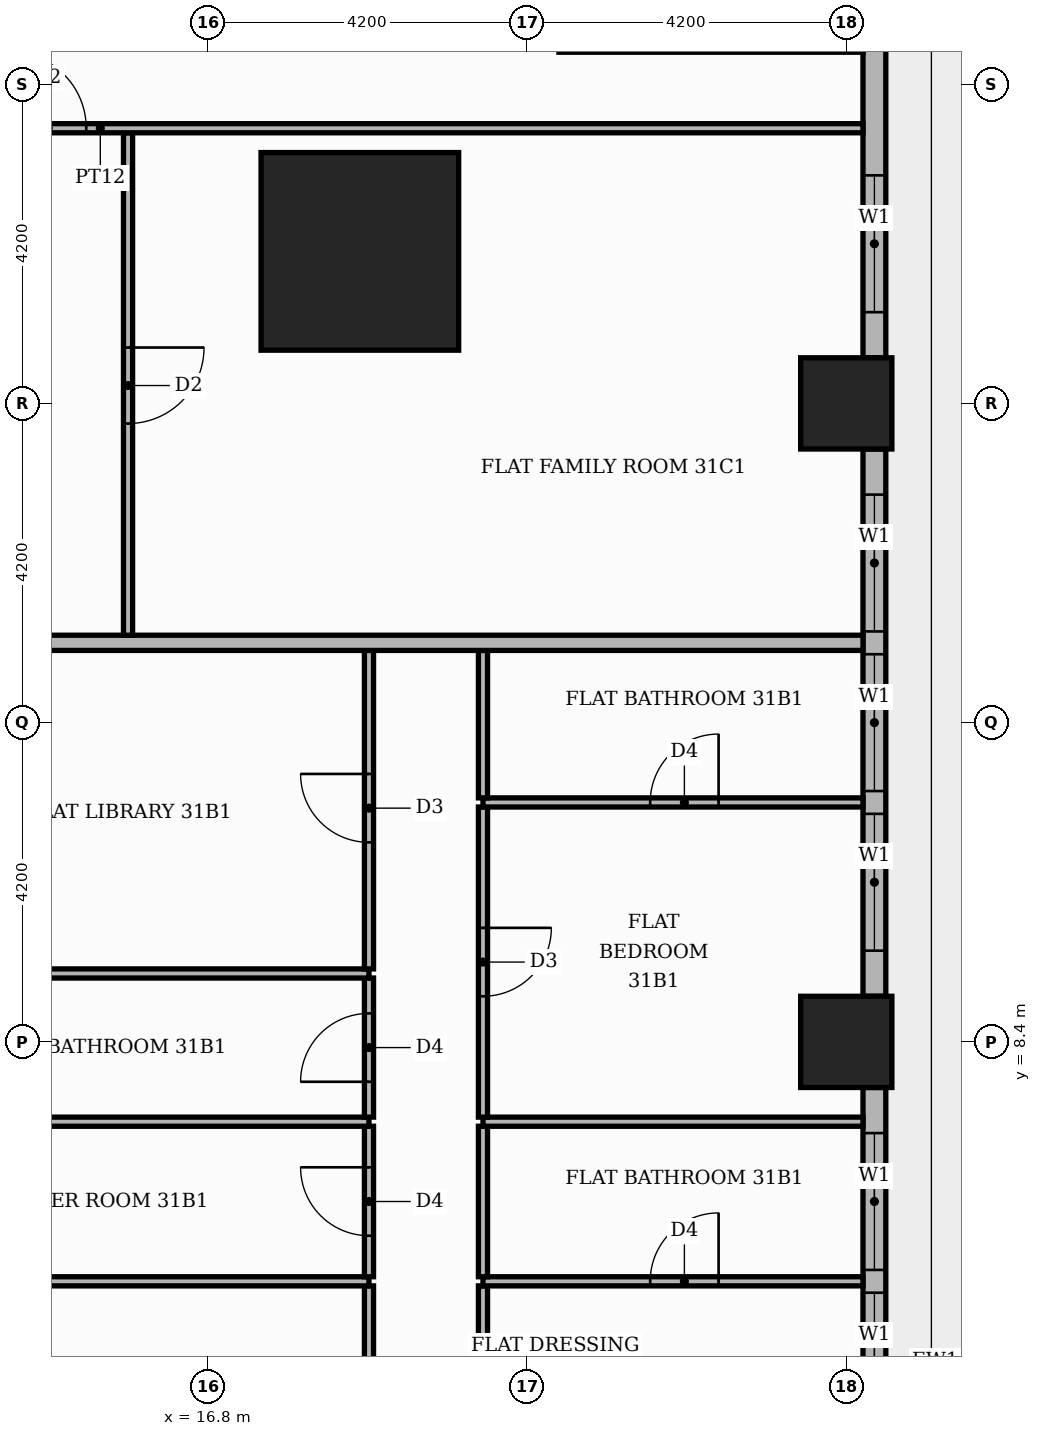
"""IFC4 building model, lengths in metres.
Left out: names, types, materials, properties, quantities, classifications, styles, units other than length and angle.
Written with IfcOpenShell. Run it as: python <this file> out.ifc"""

import sys

from ifc_helpers import new_model, si_unit, direction, frame, frame_2d, origin, origin_2d, place, context, subcontext, project, spatial, rectangle, extrude, element, fill, save


model = new_model("IFC4")
c1 = context("Model", 3, precision=1e-05, world=origin(), true_north=direction((0.0, 1.0)))
c2 = subcontext(c1, "Body", "Model", "MODEL_VIEW")
j1 = project(units=[si_unit("LENGTHUNIT", "METRE"), si_unit("PLANEANGLEUNIT", "RADIAN")], contexts=[c1])
p1 = place(None, origin())
s1 = spatial("IfcSite", under=j1, at=p1, CompositionType="ELEMENT")
p2 = place(p1, origin())
s2 = spatial("IfcBuilding", under=s1, at=p2, CompositionType="ELEMENT")
p3 = place(p2, frame((0.0, 0.0, 133.8)))
s3 = spatial("IfcBuildingStorey", under=s2, at=p3, CompositionType="ELEMENT", Elevation=133.8)
p4 = place(p3, frame((18.8, 18.8, 0.0), z_axis=(0.0, 0.0, 1.0), x_axis=(1.0, 0.0, 0.0)))
e1 = element("IfcColumn", 1, at=p4, inside=s3, PredefinedType="COLUMN", context=c2, shape_type="SweptSolid", body=[
    extrude(rectangle(XDim=2.6, YDim=2.6, at=origin_2d()), origin(), (0.0, 0.0, 1.0), 3.9),
])
for number, where, z_axis, x_axis in (
    (2, (25.2, 8.4, 0.0), (0.0, 0.0, 1.0), (1.0, 0.0, 0.0)),
    (3, (25.2, 16.8, 0.0), (0.0, 0.0, 1.0), (1.0, 0.0, 0.0)),
):
    element("IfcColumn", number, at=place(p3, frame(where, z_axis=z_axis, x_axis=x_axis)), inside=s3, PredefinedType="COLUMN", context=c2, shape_type="SweptSolid", body=[
        extrude(rectangle(XDim=1.2, YDim=1.2, at=origin_2d()), origin(), (0.0, 0.0, 1.0), 3.9),
    ])
p5 = place(p3, frame((25.57, 0.6, 0.0), z_axis=(0.0, 0.0, 1.0), x_axis=(0.0, 1.0, 0.0)))
e4 = element("IfcWall", 4, at=p5, inside=s3, PredefinedType="STANDARD", context=c2, shape_type="SweptSolid", body=[
    extrude(rectangle(XDim=7.2, YDim=0.3, at=frame_2d((3.6, 0.0))), origin(), (0.0, 0.0, 1.0), 3.48),
])
p6 = place(p5, frame((0.6, 0.0, 0.0)))
e5 = element("IfcOpeningElement", 5, at=p6, cuts=e4, PredefinedType="OPENING", context=c2, shape_type="SweptSolid", body=[
    extrude(rectangle(XDim=1.8, YDim=2.4, at=frame_2d((0.9, 1.2))), frame((0.0, 0.16, 0.0), z_axis=(0.0, -1.0, 0.0), x_axis=(1.0, 0.0, 0.0)), (0.0, 0.0, 1.0), 0.32),
])
p7 = place(p5, frame((2.7, 0.0, 0.9)))
e6 = element("IfcOpeningElement", 6, at=p7, cuts=e4, PredefinedType="OPENING", context=c2, shape_type="SweptSolid", body=[
    extrude(rectangle(XDim=1.8, YDim=2.1, at=frame_2d((0.9, 1.05))), frame((0.0, 0.16, 0.0), z_axis=(0.0, -1.0, 0.0), x_axis=(1.0, 0.0, 0.0)), (0.0, 0.0, 1.0), 0.32),
])
p8 = place(p5, frame((4.8, 0.0, 0.9)))
e7 = element("IfcOpeningElement", 7, at=p8, cuts=e4, PredefinedType="OPENING", context=c2, shape_type="SweptSolid", body=[
    extrude(rectangle(XDim=1.8, YDim=2.1, at=frame_2d((0.9, 1.05))), frame((0.0, 0.16, 0.0), z_axis=(0.0, -1.0, 0.0), x_axis=(1.0, 0.0, 0.0)), (0.0, 0.0, 1.0), 0.32),
])
p9 = place(p3, frame((25.57, 9.0, 0.0), z_axis=(0.0, 0.0, 1.0), x_axis=(0.0, 1.0, 0.0)))
e8 = element("IfcWall", 8, at=p9, inside=s3, PredefinedType="STANDARD", context=c2, shape_type="SweptSolid", body=[
    extrude(rectangle(XDim=7.2, YDim=0.3, at=frame_2d((3.6, 0.0))), origin(), (0.0, 0.0, 1.0), 3.48),
])
p10 = place(p9, frame((0.6, 0.0, 0.9)))
e9 = element("IfcOpeningElement", 9, at=p10, cuts=e8, PredefinedType="OPENING", context=c2, shape_type="SweptSolid", body=[
    extrude(rectangle(XDim=1.8, YDim=2.1, at=frame_2d((0.9, 1.05))), frame((0.0, 0.16, 0.0), z_axis=(0.0, -1.0, 0.0), x_axis=(1.0, 0.0, 0.0)), (0.0, 0.0, 1.0), 0.32),
])
p11 = place(p9, frame((2.7, 0.0, 0.9)))
e10 = element("IfcOpeningElement", 10, at=p11, cuts=e8, PredefinedType="OPENING", context=c2, shape_type="SweptSolid", body=[
    extrude(rectangle(XDim=1.8, YDim=2.1, at=frame_2d((0.9, 1.05))), frame((0.0, 0.16, 0.0), z_axis=(0.0, -1.0, 0.0), x_axis=(1.0, 0.0, 0.0)), (0.0, 0.0, 1.0), 0.32),
])
p12 = place(p9, frame((4.8, 0.0, 0.9)))
e11 = element("IfcOpeningElement", 11, at=p12, cuts=e8, PredefinedType="OPENING", context=c2, shape_type="SweptSolid", body=[
    extrude(rectangle(XDim=1.8, YDim=2.1, at=frame_2d((0.9, 1.05))), frame((0.0, 0.16, 0.0), z_axis=(0.0, -1.0, 0.0), x_axis=(1.0, 0.0, 0.0)), (0.0, 0.0, 1.0), 0.32),
])
p13 = place(p3, frame((25.57, 17.4, 0.0), z_axis=(0.0, 0.0, 1.0), x_axis=(0.0, 1.0, 0.0)))
e12 = element("IfcWall", 12, at=p13, inside=s3, PredefinedType="STANDARD", context=c2, shape_type="SweptSolid", body=[
    extrude(rectangle(XDim=4.32, YDim=0.3, at=frame_2d((2.16, 0.0))), origin(), (0.0, 0.0, 1.0), 3.48),
])
p14 = place(p13, frame((0.6, 0.0, 0.9)))
e13 = element("IfcOpeningElement", 13, at=p14, cuts=e12, PredefinedType="OPENING", context=c2, shape_type="SweptSolid", body=[
    extrude(rectangle(XDim=1.8, YDim=2.1, at=frame_2d((0.9, 1.05))), frame((0.0, 0.16, 0.0), z_axis=(0.0, -1.0, 0.0), x_axis=(1.0, 0.0, 0.0)), (0.0, 0.0, 1.0), 0.32),
])
p15 = place(p3, frame((18.92, 1.11, 0.0), z_axis=(0.0, 0.0, 1.0), x_axis=(0.0, 1.0, 0.0)))
e14 = element("IfcWall", 14, at=p15, inside=s3, PredefinedType="PARTITIONING", context=c2, shape_type="SweptSolid", body=[
    extrude(rectangle(XDim=4.08, YDim=0.12, at=frame_2d((2.04, 0.0))), origin(), (0.0, 0.0, 1.0), 3.48),
])
p16 = place(p15, frame((1.59, 0.0, 0.0)))
e15 = element("IfcOpeningElement", 15, at=p16, cuts=e14, PredefinedType="OPENING", context=c2, shape_type="SweptSolid", body=[
    extrude(rectangle(XDim=0.9, YDim=2.1, at=frame_2d((0.45, 1.05))), frame((0.0, 0.07, 0.0), z_axis=(0.0, -1.0, 0.0), x_axis=(1.0, 0.0, 0.0)), (0.0, 0.0, 1.0), 0.14),
])
p17 = place(p3, frame((20.42, 3.21, 0.0), z_axis=(0.0, 0.0, 1.0), x_axis=(0.0, 1.0, 0.0)))
e16 = element("IfcWall", 16, at=p17, inside=s3, PredefinedType="PARTITIONING", context=c2, shape_type="SweptSolid", body=[
    extrude(rectangle(XDim=1.98, YDim=0.12, at=frame_2d((0.99, 0.0))), origin(), (0.0, 0.0, 1.0), 3.48),
])
p18 = place(p3, frame((11.0, 5.25, 0.0), z_axis=(0.0, 0.0, 1.0), x_axis=(1.0, 0.0, 0.0)))
e17 = element("IfcWall", 17, at=p18, inside=s3, PredefinedType="PARTITIONING", context=c2, shape_type="SweptSolid", body=[
    extrude(rectangle(XDim=7.92, YDim=0.12, at=frame_2d((3.96, 0.0))), origin(), (0.0, 0.0, 1.0), 3.48),
])
p19 = place(p3, frame((20.42, 5.25, 0.0), z_axis=(0.0, 0.0, 1.0), x_axis=(1.0, 0.0, 0.0)))
e18 = element("IfcWall", 18, at=p19, inside=s3, PredefinedType="PARTITIONING", context=c2, shape_type="SweptSolid", body=[
    extrude(rectangle(XDim=5.0, YDim=0.12, at=frame_2d((2.5, 0.0))), origin(), (0.0, 0.0, 1.0), 3.48),
])
p20 = place(p19, frame((2.2, 0.0, 0.0)))
e19 = element("IfcOpeningElement", 19, at=p20, cuts=e18, PredefinedType="OPENING", context=c2, shape_type="SweptSolid", body=[
    extrude(rectangle(XDim=0.9, YDim=2.1, at=frame_2d((0.45, 1.05))), frame((0.0, 0.07, 0.0), z_axis=(0.0, -1.0, 0.0), x_axis=(1.0, 0.0, 0.0)), (0.0, 0.0, 1.0), 0.14),
])
p21 = place(p3, frame((18.92, 5.31, 0.0), z_axis=(0.0, 0.0, 1.0), x_axis=(0.0, 1.0, 0.0)))
e20 = element("IfcWall", 20, at=p21, inside=s3, PredefinedType="PARTITIONING", context=c2, shape_type="SweptSolid", body=[
    extrude(rectangle(XDim=1.98, YDim=0.12, at=frame_2d((0.99, 0.0))), origin(), (0.0, 0.0, 1.0), 3.48),
])
p22 = place(p21, frame((0.54, 0.0, 0.0)))
e21 = element("IfcOpeningElement", 21, at=p22, cuts=e20, PredefinedType="OPENING", context=c2, shape_type="SweptSolid", body=[
    extrude(rectangle(XDim=0.9, YDim=2.1, at=frame_2d((0.45, 1.05))), frame((0.0, 0.07, 0.0), z_axis=(0.0, -1.0, 0.0), x_axis=(1.0, 0.0, 0.0)), (0.0, 0.0, 1.0), 0.14),
])
p23 = place(p3, frame((20.42, 5.31, 0.0), z_axis=(0.0, 0.0, 1.0), x_axis=(0.0, 1.0, 0.0)))
e22 = element("IfcWall", 22, at=p23, inside=s3, PredefinedType="PARTITIONING", context=c2, shape_type="SweptSolid", body=[
    extrude(rectangle(XDim=1.98, YDim=0.12, at=frame_2d((0.99, 0.0))), origin(), (0.0, 0.0, 1.0), 3.48),
])
p24 = place(p3, frame((11.0, 7.35, 0.0), z_axis=(0.0, 0.0, 1.0), x_axis=(1.0, 0.0, 0.0)))
e23 = element("IfcWall", 23, at=p24, inside=s3, PredefinedType="PARTITIONING", context=c2, shape_type="SweptSolid", body=[
    extrude(rectangle(XDim=7.92, YDim=0.12, at=frame_2d((3.96, 0.0))), origin(), (0.0, 0.0, 1.0), 3.48),
])
p25 = place(p3, frame((20.42, 7.35, 0.0), z_axis=(0.0, 0.0, 1.0), x_axis=(1.0, 0.0, 0.0)))
e24 = element("IfcWall", 24, at=p25, inside=s3, PredefinedType="PARTITIONING", context=c2, shape_type="SweptSolid", body=[
    extrude(rectangle(XDim=5.0, YDim=0.12, at=frame_2d((2.5, 0.0))), origin(), (0.0, 0.0, 1.0), 3.48),
])
p26 = place(p3, frame((18.92, 7.41, 0.0), z_axis=(0.0, 0.0, 1.0), x_axis=(0.0, 1.0, 0.0)))
e25 = element("IfcWall", 25, at=p26, inside=s3, PredefinedType="PARTITIONING", context=c2, shape_type="SweptSolid", body=[
    extrude(rectangle(XDim=1.83, YDim=0.12, at=frame_2d((0.915, 0.0))), origin(), (0.0, 0.0, 1.0), 3.48),
])
p27 = place(p26, frame((0.465, 0.0, 0.0)))
e26 = element("IfcOpeningElement", 26, at=p27, cuts=e25, PredefinedType="OPENING", context=c2, shape_type="SweptSolid", body=[
    extrude(rectangle(XDim=0.9, YDim=2.1, at=frame_2d((0.45, 1.05))), frame((0.0, 0.07, 0.0), z_axis=(0.0, -1.0, 0.0), x_axis=(1.0, 0.0, 0.0)), (0.0, 0.0, 1.0), 0.14),
])
p28 = place(p3, frame((20.42, 7.41, 0.0), z_axis=(0.0, 0.0, 1.0), x_axis=(0.0, 1.0, 0.0)))
e27 = element("IfcWall", 27, at=p28, inside=s3, PredefinedType="PARTITIONING", context=c2, shape_type="SweptSolid", body=[
    extrude(rectangle(XDim=4.08, YDim=0.12, at=frame_2d((2.04, 0.0))), origin(), (0.0, 0.0, 1.0), 3.48),
])
p29 = place(p28, frame((1.59, 0.0, 0.0)))
e28 = element("IfcOpeningElement", 28, at=p29, cuts=e27, PredefinedType="OPENING", context=c2, shape_type="SweptSolid", body=[
    extrude(rectangle(XDim=0.9, YDim=2.1, at=frame_2d((0.45, 1.05))), frame((0.0, 0.07, 0.0), z_axis=(0.0, -1.0, 0.0), x_axis=(1.0, 0.0, 0.0)), (0.0, 0.0, 1.0), 0.14),
])
p30 = place(p3, frame((11.0, 9.3, 0.0), z_axis=(0.0, 0.0, 1.0), x_axis=(1.0, 0.0, 0.0)))
e29 = element("IfcWall", 29, at=p30, inside=s3, PredefinedType="PARTITIONING", context=c2, shape_type="SweptSolid", body=[
    extrude(rectangle(XDim=7.92, YDim=0.12, at=frame_2d((3.96, 0.0))), origin(), (0.0, 0.0, 1.0), 3.48),
])
p31 = place(p3, frame((18.92, 9.36, 0.0), z_axis=(0.0, 0.0, 1.0), x_axis=(0.0, 1.0, 0.0)))
e30 = element("IfcWall", 30, at=p31, inside=s3, PredefinedType="PARTITIONING", context=c2, shape_type="SweptSolid", body=[
    extrude(rectangle(XDim=4.19, YDim=0.12, at=frame_2d((2.095, 0.0))), origin(), (0.0, 0.0, 1.0), 3.48),
])
p32 = place(p31, frame((1.665, 0.0, 0.0)))
e31 = element("IfcOpeningElement", 31, at=p32, cuts=e30, PredefinedType="OPENING", context=c2, shape_type="SweptSolid", body=[
    extrude(rectangle(XDim=0.9, YDim=2.1, at=frame_2d((0.45, 1.05))), frame((0.0, 0.07, 0.0), z_axis=(0.0, -1.0, 0.0), x_axis=(1.0, 0.0, 0.0)), (0.0, 0.0, 1.0), 0.14),
])
p33 = place(p3, frame((20.42, 11.55, 0.0), z_axis=(0.0, 0.0, 1.0), x_axis=(1.0, 0.0, 0.0)))
e32 = element("IfcWall", 32, at=p33, inside=s3, PredefinedType="PARTITIONING", context=c2, shape_type="SweptSolid", body=[
    extrude(rectangle(XDim=5.0, YDim=0.12, at=frame_2d((2.5, 0.0))), origin(), (0.0, 0.0, 1.0), 3.48),
])
p34 = place(p33, frame((2.2, 0.0, 0.0)))
e33 = element("IfcOpeningElement", 33, at=p34, cuts=e32, PredefinedType="OPENING", context=c2, shape_type="SweptSolid", body=[
    extrude(rectangle(XDim=0.9, YDim=2.1, at=frame_2d((0.45, 1.05))), frame((0.0, 0.07, 0.0), z_axis=(0.0, -1.0, 0.0), x_axis=(1.0, 0.0, 0.0)), (0.0, 0.0, 1.0), 0.14),
])
p35 = place(p3, frame((20.42, 11.61, 0.0), z_axis=(0.0, 0.0, 1.0), x_axis=(0.0, 1.0, 0.0)))
e34 = element("IfcWall", 34, at=p35, inside=s3, PredefinedType="PARTITIONING", context=c2, shape_type="SweptSolid", body=[
    extrude(rectangle(XDim=1.94, YDim=0.12, at=frame_2d((0.97, 0.0))), origin(), (0.0, 0.0, 1.0), 3.48),
])
p36 = place(p3, frame((-13.65, 13.65, 0.0), z_axis=(0.0, 0.0, 1.0), x_axis=(1.0, 0.0, 0.0)))
e35 = element("IfcWall", 35, at=p36, inside=s3, PredefinedType="PARTITIONING", context=c2, shape_type="SweptSolid", body=[
    extrude(rectangle(XDim=39.07, YDim=0.2, at=frame_2d((19.535, 0.0))), origin(), (0.0, 0.0, 1.0), 3.48),
])
p37 = place(p36, frame((24.65, 0.0, 0.0)))
e36 = element("IfcOpeningElement", 36, at=p37, cuts=e35, PredefinedType="OPENING", context=c2, shape_type="SweptSolid", body=[
    extrude(rectangle(XDim=1.1, YDim=2.4, at=frame_2d((0.55, 1.2))), frame((0.0, 0.11, 0.0), z_axis=(0.0, -1.0, 0.0), x_axis=(1.0, 0.0, 0.0)), (0.0, 0.0, 1.0), 0.22),
])
p38 = place(p36, frame((12.05, 0.0, 0.0)))
e37 = element("IfcOpeningElement", 37, at=p38, cuts=e35, PredefinedType="OPENING", context=c2, shape_type="SweptSolid", body=[
    extrude(rectangle(XDim=1.1, YDim=2.4, at=frame_2d((0.55, 1.2))), frame((0.0, 0.11, 0.0), z_axis=(0.0, -1.0, 0.0), x_axis=(1.0, 0.0, 0.0)), (0.0, 0.0, 1.0), 0.22),
])
p39 = place(p3, frame((15.75, 13.75, 0.0), z_axis=(0.0, 0.0, 1.0), x_axis=(0.0, 1.0, 0.0)))
e38 = element("IfcWall", 38, at=p39, inside=s3, PredefinedType="PARTITIONING", context=c2, shape_type="SweptSolid", body=[
    extrude(rectangle(XDim=6.61, YDim=0.12, at=frame_2d((3.305, 0.0))), origin(), (0.0, 0.0, 1.0), 3.48),
])
p40 = place(p39, frame((2.785, 0.0, 0.0)))
e39 = element("IfcOpeningElement", 39, at=p40, cuts=e38, PredefinedType="OPENING", context=c2, shape_type="SweptSolid", body=[
    extrude(rectangle(XDim=1.0, YDim=2.1, at=frame_2d((0.5, 1.05))), frame((0.0, 0.07, 0.0), z_axis=(0.0, -1.0, 0.0), x_axis=(1.0, 0.0, 0.0)), (0.0, 0.0, 1.0), 0.14),
])
p41 = place(p3, frame((5.35, 20.42, 0.0), z_axis=(0.0, 0.0, 1.0), x_axis=(1.0, 0.0, 0.0)))
e40 = element("IfcWall", 40, at=p41, inside=s3, PredefinedType="PARTITIONING", context=c2, shape_type="SweptSolid", body=[
    extrude(rectangle(XDim=20.07, YDim=0.12, at=frame_2d((10.035, 0.0))), origin(), (0.0, 0.0, 1.0), 3.48),
])
p42 = place(p41, frame((8.85, 0.0, 0.0)))
e41 = element("IfcOpeningElement", 41, at=p42, cuts=e40, PredefinedType="OPENING", context=c2, shape_type="SweptSolid", body=[
    extrude(rectangle(XDim=1.0, YDim=2.1, at=frame_2d((0.5, 1.05))), frame((0.0, 0.07, 0.0), z_axis=(0.0, -1.0, 0.0), x_axis=(1.0, 0.0, 0.0)), (0.0, 0.0, 1.0), 0.14),
])
p43 = place(p41, frame((5.75, 0.0, 0.0)))
e42 = element("IfcOpeningElement", 42, at=p43, cuts=e40, PredefinedType="OPENING", context=c2, shape_type="SweptSolid", body=[
    extrude(rectangle(XDim=0.9, YDim=2.1, at=frame_2d((0.45, 1.05))), frame((0.0, 0.07, 0.0), z_axis=(0.0, -1.0, 0.0), x_axis=(1.0, 0.0, 0.0)), (0.0, 0.0, 1.0), 0.14),
])
p44 = place(p7, origin())
e43 = element("IfcWindow", 43, at=p44, inside=s3, PartitioningType="SINGLE_PANEL", PredefinedType="WINDOW", context=c2, shape_type="SweptSolid", body=[
    extrude(rectangle(XDim=1.8, YDim=2.1, at=frame_2d((0.9, 1.05))), frame((0.0, 0.03, 0.0), z_axis=(0.0, -1.0, 0.0), x_axis=(1.0, 0.0, 0.0)), (0.0, 0.0, 1.0), 0.06),
])
fill(e6, e43)
p45 = place(p8, origin())
e44 = element("IfcWindow", 44, at=p45, inside=s3, PartitioningType="SINGLE_PANEL", PredefinedType="WINDOW", context=c2, shape_type="SweptSolid", body=[
    extrude(rectangle(XDim=1.8, YDim=2.1, at=frame_2d((0.9, 1.05))), frame((0.0, 0.03, 0.0), z_axis=(0.0, -1.0, 0.0), x_axis=(1.0, 0.0, 0.0)), (0.0, 0.0, 1.0), 0.06),
])
fill(e7, e44)
p46 = place(p10, origin())
e45 = element("IfcWindow", 45, at=p46, inside=s3, PartitioningType="SINGLE_PANEL", PredefinedType="WINDOW", context=c2, shape_type="SweptSolid", body=[
    extrude(rectangle(XDim=1.8, YDim=2.1, at=frame_2d((0.9, 1.05))), frame((0.0, 0.03, 0.0), z_axis=(0.0, -1.0, 0.0), x_axis=(1.0, 0.0, 0.0)), (0.0, 0.0, 1.0), 0.06),
])
fill(e9, e45)
p47 = place(p11, origin())
e46 = element("IfcWindow", 46, at=p47, inside=s3, PartitioningType="SINGLE_PANEL", PredefinedType="WINDOW", context=c2, shape_type="SweptSolid", body=[
    extrude(rectangle(XDim=1.8, YDim=2.1, at=frame_2d((0.9, 1.05))), frame((0.0, 0.03, 0.0), z_axis=(0.0, -1.0, 0.0), x_axis=(1.0, 0.0, 0.0)), (0.0, 0.0, 1.0), 0.06),
])
fill(e10, e46)
p48 = place(p12, origin())
e47 = element("IfcWindow", 47, at=p48, inside=s3, PartitioningType="SINGLE_PANEL", PredefinedType="WINDOW", context=c2, shape_type="SweptSolid", body=[
    extrude(rectangle(XDim=1.8, YDim=2.1, at=frame_2d((0.9, 1.05))), frame((0.0, 0.03, 0.0), z_axis=(0.0, -1.0, 0.0), x_axis=(1.0, 0.0, 0.0)), (0.0, 0.0, 1.0), 0.06),
])
fill(e11, e47)
p49 = place(p14, origin())
e48 = element("IfcWindow", 48, at=p49, inside=s3, PartitioningType="SINGLE_PANEL", PredefinedType="WINDOW", context=c2, shape_type="SweptSolid", body=[
    extrude(rectangle(XDim=1.8, YDim=2.1, at=frame_2d((0.9, 1.05))), frame((0.0, 0.03, 0.0), z_axis=(0.0, -1.0, 0.0), x_axis=(1.0, 0.0, 0.0)), (0.0, 0.0, 1.0), 0.06),
])
fill(e13, e48)
p50 = place(p22, origin())
e49 = element("IfcDoor", 49, at=p50, inside=s3, OperationType="SINGLE_SWING_RIGHT", PredefinedType="DOOR", context=c2, shape_type="SweptSolid", body=[
    extrude(rectangle(XDim=0.9, YDim=2.1, at=frame_2d((0.45, 1.05))), frame((0.0, 0.025, 0.0), z_axis=(0.0, -1.0, 0.0), x_axis=(1.0, 0.0, 0.0)), (0.0, 0.0, 1.0), 0.05),
])
fill(e21, e49)
p51 = place(p27, origin())
e50 = element("IfcDoor", 50, at=p51, inside=s3, OperationType="SINGLE_SWING_LEFT", PredefinedType="DOOR", context=c2, shape_type="SweptSolid", body=[
    extrude(rectangle(XDim=0.9, YDim=2.1, at=frame_2d((0.45, 1.05))), frame((0.0, 0.025, 0.0), z_axis=(0.0, -1.0, 0.0), x_axis=(1.0, 0.0, 0.0)), (0.0, 0.0, 1.0), 0.05),
])
fill(e26, e50)
p52 = place(p32, origin())
e51 = element("IfcDoor", 51, at=p52, inside=s3, OperationType="SINGLE_SWING_RIGHT", PredefinedType="DOOR", context=c2, shape_type="SweptSolid", body=[
    extrude(rectangle(XDim=0.9, YDim=2.1, at=frame_2d((0.45, 1.05))), frame((0.0, 0.025, 0.0), z_axis=(0.0, -1.0, 0.0), x_axis=(1.0, 0.0, 0.0)), (0.0, 0.0, 1.0), 0.05),
])
fill(e31, e51)
p53 = place(p20, origin())
e52 = element("IfcDoor", 52, at=p53, inside=s3, OperationType="SINGLE_SWING_RIGHT", PredefinedType="DOOR", context=c2, shape_type="SweptSolid", body=[
    extrude(rectangle(XDim=0.9, YDim=2.1, at=frame_2d((0.45, 1.05))), frame((0.0, 0.025, 0.0), z_axis=(0.0, -1.0, 0.0), x_axis=(1.0, 0.0, 0.0)), (0.0, 0.0, 1.0), 0.05),
])
fill(e19, e52)
p54 = place(p29, frame((0.9, 0.0, 0.0), z_axis=(0.0, 0.0, 1.0), x_axis=(-1.0, 0.0, 0.0)))
e53 = element("IfcDoor", 53, at=p54, inside=s3, OperationType="SINGLE_SWING_RIGHT", PredefinedType="DOOR", context=c2, shape_type="SweptSolid", body=[
    extrude(rectangle(XDim=0.9, YDim=2.1, at=frame_2d((0.45, 1.05))), frame((0.0, 0.025, 0.0), z_axis=(0.0, -1.0, 0.0), x_axis=(1.0, 0.0, 0.0)), (0.0, 0.0, 1.0), 0.05),
])
fill(e28, e53)
p55 = place(p34, origin())
e54 = element("IfcDoor", 54, at=p55, inside=s3, OperationType="SINGLE_SWING_RIGHT", PredefinedType="DOOR", context=c2, shape_type="SweptSolid", body=[
    extrude(rectangle(XDim=0.9, YDim=2.1, at=frame_2d((0.45, 1.05))), frame((0.0, 0.025, 0.0), z_axis=(0.0, -1.0, 0.0), x_axis=(1.0, 0.0, 0.0)), (0.0, 0.0, 1.0), 0.05),
])
fill(e33, e54)
p56 = place(p40, frame((1.0, 0.0, 0.0), z_axis=(0.0, 0.0, 1.0), x_axis=(-1.0, 0.0, 0.0)))
e55 = element("IfcDoor", 55, at=p56, inside=s3, OperationType="SINGLE_SWING_RIGHT", PredefinedType="DOOR", context=c2, shape_type="SweptSolid", body=[
    extrude(rectangle(XDim=1.0, YDim=2.1, at=frame_2d((0.5, 1.05))), frame((0.0, 0.025, 0.0), z_axis=(0.0, -1.0, 0.0), x_axis=(1.0, 0.0, 0.0)), (0.0, 0.0, 1.0), 0.05),
])
fill(e39, e55)
p57 = place(p42, origin())
e56 = element("IfcDoor", 56, at=p57, inside=s3, OperationType="SINGLE_SWING_LEFT", PredefinedType="DOOR", context=c2, shape_type="SweptSolid", body=[
    extrude(rectangle(XDim=1.0, YDim=2.1, at=frame_2d((0.5, 1.05))), frame((0.0, 0.025, 0.0), z_axis=(0.0, -1.0, 0.0), x_axis=(1.0, 0.0, 0.0)), (0.0, 0.0, 1.0), 0.05),
])
fill(e41, e56)
save(model, sys.argv[1])
